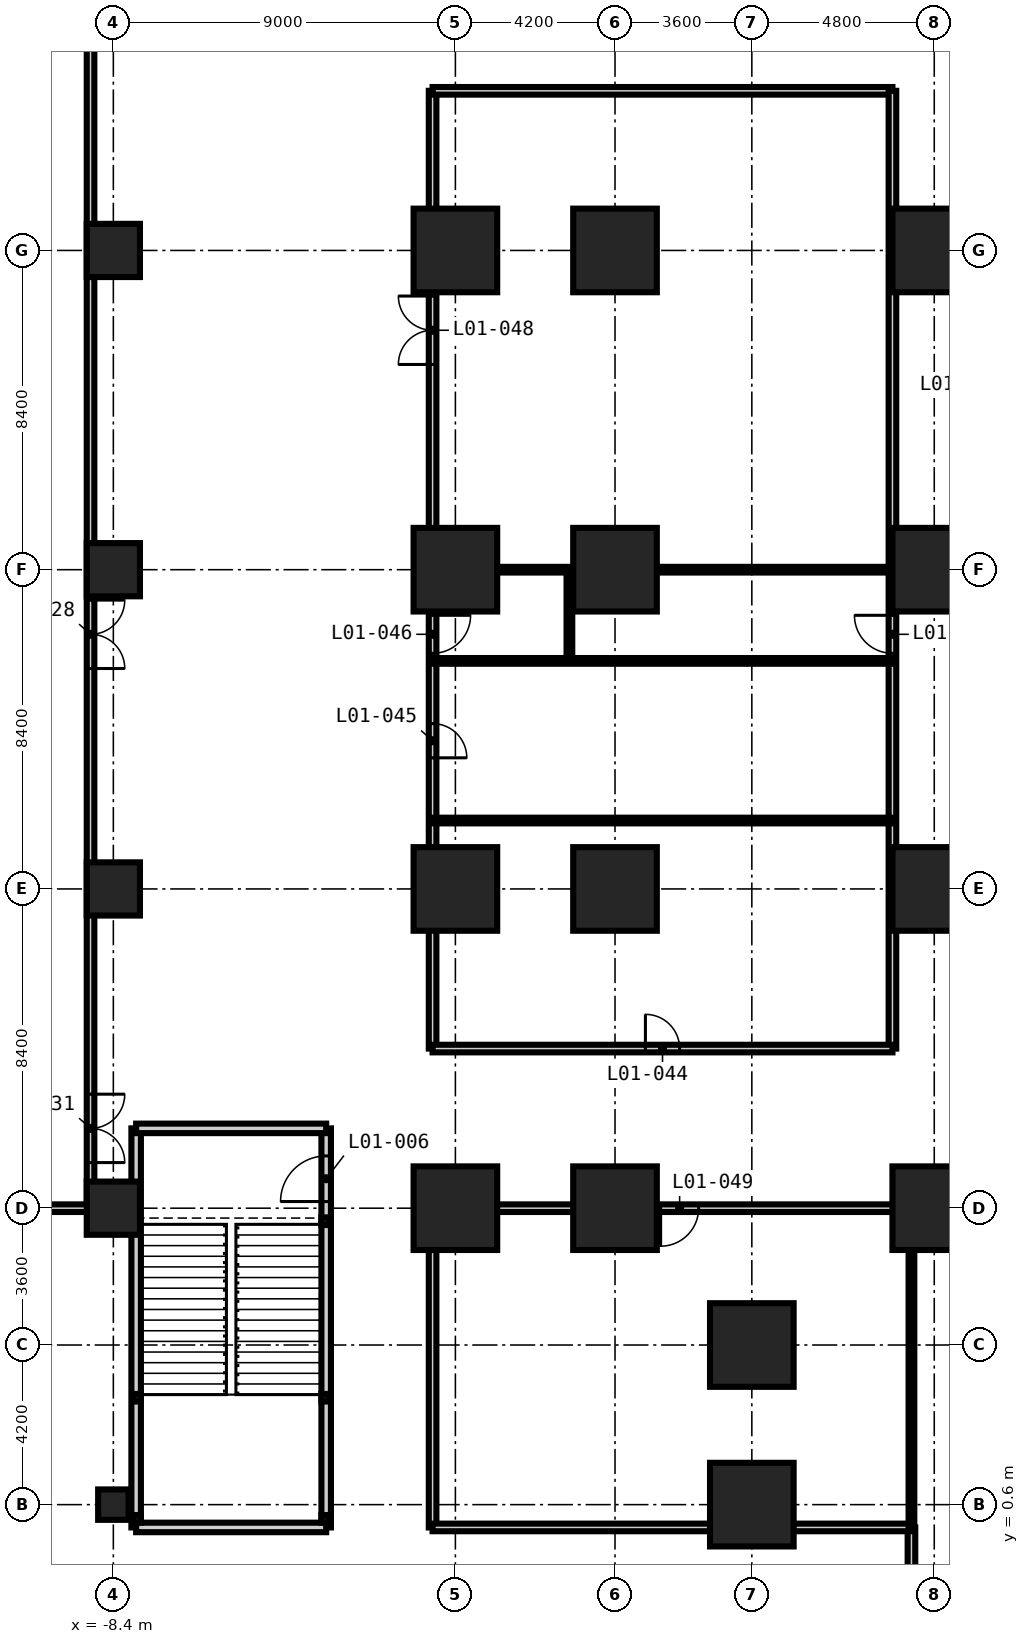
"""IFC4 building model, lengths in metres.
Left out: names, types, materials, properties, quantities, classifications, styles, units other than length and angle.
Written with IfcOpenShell. Run it as: python <this file> out.ifc"""

import sys

from ifc_helpers import new_model, si_unit, direction, frame, frame_2d, origin, origin_with_axes, origin_2d, place, context, subcontext, project, spatial, rectangle, hollow_rectangle, extrude, element, fill, save


model = new_model("IFC4")
c1 = context("Model", 3, precision=1e-05, world=origin(), true_north=direction((0.0, 1.0)))
c2 = subcontext(c1, "Body", "Model", "MODEL_VIEW")
j1 = project(units=[si_unit("LENGTHUNIT", "METRE"), si_unit("PLANEANGLEUNIT", "RADIAN")], contexts=[c1])
p1 = place(None, origin())
s1 = spatial("IfcSite", under=j1, at=p1, CompositionType="ELEMENT")
p2 = place(p1, origin())
s2 = spatial("IfcBuilding", under=s1, at=p2, CompositionType="ELEMENT")
p3 = place(p2, frame((0.0, 0.0, 6.0)))
s3 = spatial("IfcBuildingStorey", under=s2, at=p3, CompositionType="ELEMENT", Elevation=6.0)
for number, where, z_axis, x_axis in (
    (1, (0.6, 8.4, -0.3), (0.0, 0.0, 1.0), (1.0, 0.0, 0.0)),
    (2, (0.6, 16.8, -0.3), (0.0, 0.0, 1.0), (1.0, 0.0, 0.0)),
    (3, (0.6, 25.2, -0.3), (0.0, 0.0, 1.0), (1.0, 0.0, 0.0)),
    (4, (0.6, 33.6, -0.3), (0.0, 0.0, 1.0), (1.0, 0.0, 0.0)),
    (5, (4.8, 8.4, -0.3), (0.0, 0.0, 1.0), (1.0, 0.0, 0.0)),
    (6, (4.8, 16.8, -0.3), (0.0, 0.0, 1.0), (1.0, 0.0, 0.0)),
    (7, (4.8, 25.2, -0.3), (0.0, 0.0, 1.0), (1.0, 0.0, 0.0)),
    (8, (4.8, 33.6, -0.3), (0.0, 0.0, 1.0), (1.0, 0.0, 0.0)),
    (9, (8.4, 0.6, -0.3), (0.0, 0.0, 1.0), (1.0, 0.0, 0.0)),
    (10, (8.4, 4.8, -0.3), (0.0, 0.0, 1.0), (1.0, 0.0, 0.0)),
    (11, (13.2, 8.4, -0.3), (0.0, 0.0, 1.0), (1.0, 0.0, 0.0)),
    (12, (13.2, 16.8, -0.3), (0.0, 0.0, 1.0), (1.0, 0.0, 0.0)),
    (13, (13.2, 25.2, -0.3), (0.0, 0.0, 1.0), (1.0, 0.0, 0.0)),
    (14, (13.2, 33.6, -0.3), (0.0, 0.0, 1.0), (1.0, 0.0, 0.0)),
):
    element("IfcColumn", number, at=place(p3, frame(where, z_axis=z_axis, x_axis=x_axis)), inside=s3, PredefinedType="COLUMN", context=c2, shape_type="SweptSolid", body=[
        extrude(rectangle(XDim=2.2, YDim=2.2, at=origin_2d()), origin(), (0.0, 0.0, 1.0), 6.0),
    ])
p4 = place(p3, frame((-8.4, 0.6, -0.3), z_axis=(0.0, 0.0, 1.0), x_axis=(1.0, 0.0, 0.0)))
e15 = element("IfcColumn", 15, at=p4, inside=s3, PredefinedType="COLUMN", context=c2, shape_type="SweptSolid", body=[
    extrude(rectangle(XDim=0.8, YDim=0.8, at=origin_2d()), origin(), (0.0, 0.0, 1.0), 6.0),
])
for number, where, z_axis, x_axis in (
    (16, (-8.4, 8.4, -0.3), (0.0, 0.0, 1.0), (1.0, 0.0, 0.0)),
    (17, (-8.4, 16.8, -0.3), (0.0, 0.0, 1.0), (1.0, 0.0, 0.0)),
    (18, (-8.4, 25.2, -0.3), (0.0, 0.0, 1.0), (1.0, 0.0, 0.0)),
    (19, (-8.4, 33.6, -0.3), (0.0, 0.0, 1.0), (1.0, 0.0, 0.0)),
):
    element("IfcColumn", number, at=place(p3, frame(where, z_axis=z_axis, x_axis=x_axis)), inside=s3, PredefinedType="COLUMN", context=c2, shape_type="SweptSolid", body=[
        extrude(rectangle(XDim=1.4, YDim=1.4, at=origin_2d()), origin(), (0.0, 0.0, 1.0), 6.0),
    ])
p5 = place(p3, frame((0.0, 0.0, 0.0), z_axis=(0.0, 0.0, 1.0), x_axis=(0.0, 1.0, 0.0)))
e20 = element("IfcWall", 20, at=p5, inside=s3, PredefinedType="PARTITIONING", context=c2, shape_type="SweptSolid", body=[
    extrude(rectangle(XDim=8.4, YDim=0.2, at=frame_2d((4.2, 0.0))), origin(), (0.0, 0.0, 1.0), 5.7),
])
p6 = place(p3, frame((0.0, 12.6, 0.0), z_axis=(0.0, 0.0, 1.0), x_axis=(0.0, 1.0, 0.0)))
e21 = element("IfcWall", 21, at=p6, inside=s3, PredefinedType="PARTITIONING", context=c2, shape_type="SweptSolid", body=[
    extrude(rectangle(XDim=25.2, YDim=0.2, at=frame_2d((12.6, 0.0))), origin(), (0.0, 0.0, 1.0), 5.7),
])
p7 = place(p6, frame((7.65, 0.0, 0.0)))
e22 = element("IfcOpeningElement", 22, at=p7, cuts=e21, PredefinedType="OPENING", context=c2, shape_type="SweptSolid", body=[
    extrude(rectangle(XDim=0.9, YDim=2.1, at=frame_2d((0.45, 1.05))), frame((0.0, 0.11, 0.0), z_axis=(0.0, -1.0, 0.0), x_axis=(1.0, 0.0, 0.0)), (0.0, 0.0, 1.0), 0.22),
])
p8 = place(p6, frame((10.4, 0.0, 0.0)))
e23 = element("IfcOpeningElement", 23, at=p8, cuts=e21, PredefinedType="OPENING", context=c2, shape_type="SweptSolid", body=[
    extrude(rectangle(XDim=1.0, YDim=2.1, at=frame_2d((0.5, 1.05))), frame((0.0, 0.11, 0.0), z_axis=(0.0, -1.0, 0.0), x_axis=(1.0, 0.0, 0.0)), (0.0, 0.0, 1.0), 0.22),
])
p9 = place(p6, frame((18.0, 0.0, 0.0)))
e24 = element("IfcOpeningElement", 24, at=p9, cuts=e21, PredefinedType="OPENING", context=c2, shape_type="SweptSolid", body=[
    extrude(rectangle(XDim=1.8, YDim=2.4, at=frame_2d((0.9, 1.2))), frame((0.0, 0.11, 0.0), z_axis=(0.0, -1.0, 0.0), x_axis=(1.0, 0.0, 0.0)), (0.0, 0.0, 1.0), 0.22),
])
p10 = place(p3, frame((12.1, 12.6, 0.0), z_axis=(0.0, 0.0, 1.0), x_axis=(0.0, 1.0, 0.0)))
e25 = element("IfcWall", 25, at=p10, inside=s3, PredefinedType="PARTITIONING", context=c2, shape_type="SweptSolid", body=[
    extrude(rectangle(XDim=12.6, YDim=0.2, at=frame_2d((6.3, 0.0))), origin(), (0.0, 0.0, 1.0), 5.7),
])
p11 = place(p10, frame((10.4, 0.0, 0.0)))
e26 = element("IfcOpeningElement", 26, at=p11, cuts=e25, PredefinedType="OPENING", context=c2, shape_type="SweptSolid", body=[
    extrude(rectangle(XDim=1.0, YDim=2.1, at=frame_2d((0.5, 1.05))), frame((0.0, 0.11, 0.0), z_axis=(0.0, -1.0, 0.0), x_axis=(1.0, 0.0, 0.0)), (0.0, 0.0, 1.0), 0.22),
])
p12 = place(p3, frame((12.6, -8.4, 0.0), z_axis=(0.0, 0.0, 1.0), x_axis=(0.0, 1.0, 0.0)))
e27 = element("IfcWall", 27, at=p12, inside=s3, PredefinedType="PARTITIONING", context=c2, shape_type="SweptSolid", body=[
    extrude(rectangle(XDim=8.4, YDim=0.2, at=frame_2d((4.2, 0.0))), origin(), (0.0, 0.0, 1.0), 5.7),
])
p13 = place(p3, origin_with_axes())
e28 = element("IfcWall", 28, at=p13, inside=s3, PredefinedType="PARTITIONING", context=c2, shape_type="SweptSolid", body=[
    extrude(rectangle(XDim=12.6, YDim=0.2, at=frame_2d((6.3, 0.0))), origin(), (0.0, 0.0, 1.0), 5.7),
])
p14 = place(p3, frame((0.0, 8.4, 0.0), z_axis=(0.0, 0.0, 1.0), x_axis=(1.0, 0.0, 0.0)))
e29 = element("IfcWall", 29, at=p14, inside=s3, PredefinedType="PARTITIONING", context=c2, shape_type="SweptSolid", body=[
    extrude(rectangle(XDim=42.0, YDim=0.2, at=frame_2d((21.0, 0.0))), origin(), (0.0, 0.0, 1.0), 5.7),
])
p15 = place(p14, frame((6.0, 0.0, 0.0)))
e30 = element("IfcOpeningElement", 30, at=p15, cuts=e29, PredefinedType="OPENING", context=c2, shape_type="SweptSolid", body=[
    extrude(rectangle(XDim=1.0, YDim=2.1, at=frame_2d((0.5, 1.05))), frame((0.0, 0.11, 0.0), z_axis=(0.0, -1.0, 0.0), x_axis=(1.0, 0.0, 0.0)), (0.0, 0.0, 1.0), 0.22),
])
p16 = place(p14, frame((18.0, 0.0, 0.0)))
e31 = element("IfcOpeningElement", 31, at=p16, cuts=e29, PredefinedType="OPENING", context=c2, shape_type="SweptSolid", body=[
    extrude(rectangle(XDim=1.8, YDim=2.4, at=frame_2d((0.9, 1.2))), frame((0.0, 0.11, 0.0), z_axis=(0.0, -1.0, 0.0), x_axis=(1.0, 0.0, 0.0)), (0.0, 0.0, 1.0), 0.22),
])
p17 = place(p14, frame((28.9, 0.0, 0.0)))
e32 = element("IfcOpeningElement", 32, at=p17, cuts=e29, PredefinedType="OPENING", context=c2, shape_type="SweptSolid", body=[
    extrude(rectangle(XDim=1.0, YDim=2.1, at=frame_2d((0.5, 1.05))), frame((0.0, 0.11, 0.0), z_axis=(0.0, -1.0, 0.0), x_axis=(1.0, 0.0, 0.0)), (0.0, 0.0, 1.0), 0.22),
])
p18 = place(p3, frame((0.0, 12.6, 0.0), z_axis=(0.0, 0.0, 1.0), x_axis=(1.0, 0.0, 0.0)))
e33 = element("IfcWall", 33, at=p18, inside=s3, PredefinedType="PARTITIONING", context=c2, shape_type="SweptSolid", body=[
    extrude(rectangle(XDim=12.1, YDim=0.2, at=frame_2d((6.05, 0.0))), origin(), (0.0, 0.0, 1.0), 5.7),
])
p19 = place(p18, frame((5.6, 0.0, 0.0)))
e34 = element("IfcOpeningElement", 34, at=p19, cuts=e33, PredefinedType="OPENING", context=c2, shape_type="SweptSolid", body=[
    extrude(rectangle(XDim=0.9, YDim=2.1, at=frame_2d((0.45, 1.05))), frame((0.0, 0.11, 0.0), z_axis=(0.0, -1.0, 0.0), x_axis=(1.0, 0.0, 0.0)), (0.0, 0.0, 1.0), 0.22),
])
p20 = place(p3, frame((0.0, 37.8, 0.0), z_axis=(0.0, 0.0, 1.0), x_axis=(1.0, 0.0, 0.0)))
e35 = element("IfcWall", 35, at=p20, inside=s3, PredefinedType="PARTITIONING", context=c2, shape_type="SweptSolid", body=[
    extrude(rectangle(XDim=12.1, YDim=0.2, at=frame_2d((6.05, 0.0))), origin(), (0.0, 0.0, 1.0), 5.7),
])
p21 = place(p3, frame((-9.0, 42.0, 0.0), z_axis=(0.0, 0.0, 1.0), x_axis=(0.0, -1.0, 0.0)))
e36 = element("IfcWall", 36, at=p21, inside=s3, PredefinedType="PARTITIONING", context=c2, shape_type="SweptSolid", body=[
    extrude(rectangle(XDim=33.6, YDim=0.2, at=frame_2d((16.8, 0.0))), origin(), (0.0, 0.0, 1.0), 5.7),
])
p22 = place(p21, frame((17.6, 0.0, 0.0)))
e37 = element("IfcOpeningElement", 37, at=p22, cuts=e36, PredefinedType="OPENING", context=c2, shape_type="SweptSolid", body=[
    extrude(rectangle(XDim=1.8, YDim=2.4, at=frame_2d((0.9, 1.2))), frame((0.0, 0.11, 0.0), z_axis=(0.0, -1.0, 0.0), x_axis=(1.0, 0.0, 0.0)), (0.0, 0.0, 1.0), 0.22),
])
p23 = place(p21, frame((1.2, 0.0, 0.0)))
e38 = element("IfcOpeningElement", 38, at=p23, cuts=e36, PredefinedType="OPENING", context=c2, shape_type="SweptSolid", body=[
    extrude(rectangle(XDim=1.8, YDim=2.4, at=frame_2d((0.9, 1.2))), frame((0.0, 0.11, 0.0), z_axis=(0.0, -1.0, 0.0), x_axis=(1.0, 0.0, 0.0)), (0.0, 0.0, 1.0), 0.22),
])
p24 = place(p21, frame((30.6, 0.0, 0.0)))
e39 = element("IfcOpeningElement", 39, at=p24, cuts=e36, PredefinedType="OPENING", context=c2, shape_type="SweptSolid", body=[
    extrude(rectangle(XDim=1.8, YDim=2.4, at=frame_2d((0.9, 1.2))), frame((0.0, 0.11, 0.0), z_axis=(0.0, -1.0, 0.0), x_axis=(1.0, 0.0, 0.0)), (0.0, 0.0, 1.0), 0.22),
])
p25 = place(p3, frame((12.1, 37.8, 0.0), z_axis=(0.0, 0.0, 1.0), x_axis=(0.0, -1.0, 0.0)))
e40 = element("IfcWall", 40, at=p25, inside=s3, PredefinedType="PARTITIONING", context=c2, shape_type="SweptSolid", body=[
    extrude(rectangle(XDim=12.6, YDim=0.2, at=frame_2d((6.3, 0.0))), origin(), (0.0, 0.0, 1.0), 5.7),
])
p26 = place(p3, frame((-9.0, 8.4, 0.0), z_axis=(0.0, 0.0, 1.0), x_axis=(-1.0, 0.0, 0.0)))
e41 = element("IfcWall", 41, at=p26, inside=s3, PredefinedType="PARTITIONING", context=c2, shape_type="SweptSolid", body=[
    extrude(rectangle(XDim=7.8, YDim=0.2, at=frame_2d((3.9, 0.0))), origin(), (0.0, 0.0, 1.0), 5.7),
])
p27 = place(p26, frame((3.0, 0.0, 0.0)))
e42 = element("IfcOpeningElement", 42, at=p27, cuts=e41, PredefinedType="OPENING", context=c2, shape_type="SweptSolid", body=[
    extrude(rectangle(XDim=1.8, YDim=2.4, at=frame_2d((0.9, 1.2))), frame((0.0, 0.11, 0.0), z_axis=(0.0, -1.0, 0.0), x_axis=(1.0, 0.0, 0.0)), (0.0, 0.0, 1.0), 0.22),
])
p28 = place(p3, frame((3.6, 22.8, 0.0), z_axis=(0.0, 0.0, 1.0), x_axis=(0.0, 1.0, 0.0)))
e43 = element("IfcWall", 43, at=p28, inside=s3, PredefinedType="PARTITIONING", context=c2, shape_type="SweptSolid", body=[
    extrude(rectangle(XDim=2.4, YDim=0.15, at=frame_2d((1.2, 0.0))), origin(), (0.0, 0.0, 1.0), 5.7),
])
p29 = place(p3, frame((12.6, 0.0, 0.0), z_axis=(0.0, 0.0, 1.0), x_axis=(0.0, 1.0, 0.0)))
e44 = element("IfcWall", 44, at=p29, inside=s3, PredefinedType="PARTITIONING", context=c2, shape_type="SweptSolid", body=[
    extrude(rectangle(XDim=8.4, YDim=0.15, at=frame_2d((4.2, 0.0))), origin(), (0.0, 0.0, 1.0), 5.7),
])
for number, where, z_axis, x_axis in (
    (45, (0.0, 18.6, 0.0), (0.0, 0.0, 1.0), (1.0, 0.0, 0.0)),
    (46, (0.0, 22.8, 0.0), (0.0, 0.0, 1.0), (1.0, 0.0, 0.0)),
    (47, (0.0, 25.2, 0.0), (0.0, 0.0, 1.0), (1.0, 0.0, 0.0)),
):
    element("IfcWall", number, at=place(p3, frame(where, z_axis=z_axis, x_axis=x_axis)), inside=s3, PredefinedType="PARTITIONING", context=c2, shape_type="SweptSolid", body=[
        extrude(rectangle(XDim=12.1, YDim=0.15, at=frame_2d((6.05, 0.0))), origin(), (0.0, 0.0, 1.0), 5.7),
    ])
p30 = place(p3, frame((-7.8, 0.0, 0.0), z_axis=(0.0, 0.0, 1.0), x_axis=(0.0, 1.0, 0.0)))
e48 = element("IfcWall", 48, at=p30, inside=s3, PredefinedType="PARTITIONING", context=c2, shape_type="SweptSolid", body=[
    extrude(rectangle(XDim=10.5, YDim=0.25, at=frame_2d((5.25, 0.0))), origin(), (0.0, 0.0, 1.0), 5.7),
])
p31 = place(p3, frame((-2.8, 0.0, 0.0), z_axis=(0.0, 0.0, 1.0), x_axis=(0.0, 1.0, 0.0)))
e49 = element("IfcWall", 49, at=p31, inside=s3, PredefinedType="PARTITIONING", context=c2, shape_type="SweptSolid", body=[
    extrude(rectangle(XDim=10.5, YDim=0.25, at=frame_2d((5.25, 0.0))), origin(), (0.0, 0.0, 1.0), 5.7),
])
p32 = place(p31, frame((8.575, 0.0, 0.0)))
e50 = element("IfcOpeningElement", 50, at=p32, cuts=e49, PredefinedType="OPENING", context=c2, shape_type="SweptSolid", body=[
    extrude(rectangle(XDim=1.2, YDim=2.2, at=frame_2d((0.6, 1.1))), frame((0.0, 0.135, 0.0), z_axis=(0.0, -1.0, 0.0), x_axis=(1.0, 0.0, 0.0)), (0.0, 0.0, 1.0), 0.27),
])
for number, where, z_axis, x_axis in (
    (51, (-7.8, 0.0, 0.0), (0.0, 0.0, 1.0), (1.0, 0.0, 0.0)),
    (52, (-7.8, 10.5, 0.0), (0.0, 0.0, 1.0), (1.0, 0.0, 0.0)),
):
    element("IfcWall", number, at=place(p3, frame(where, z_axis=z_axis, x_axis=x_axis)), inside=s3, PredefinedType="PARTITIONING", context=c2, shape_type="SweptSolid", body=[
        extrude(rectangle(XDim=5.0, YDim=0.25, at=frame_2d((2.5, 0.0))), origin(), (0.0, 0.0, 1.0), 5.7),
    ])
for number, where, z_axis, x_axis in (
    (53, (-2.825, 8.058, -0.3), (0.0, 0.0, 1.0), (1.0, 0.0, 0.0)),
    (54, (-7.775, 3.413, -0.3), (0.0, 0.0, 1.0), (1.0, 0.0, 0.0)),
    (55, (-2.825, 3.413, -0.3), (0.0, 0.0, 1.0), (1.0, 0.0, 0.0)),
    (56, (-7.775, 0.225, -0.3), (0.0, 0.0, 1.0), (1.0, 0.0, 0.0)),
    (57, (-2.825, 0.225, -0.3), (0.0, 0.0, 1.0), (1.0, 0.0, 0.0)),
):
    element("IfcColumn", number, at=place(p3, frame(where, z_axis=z_axis, x_axis=x_axis)), inside=s3, PredefinedType="COLUMN", context=c2, shape_type="SweptSolid", body=[
        extrude(hollow_rectangle(XDim=0.2, YDim=0.2, WallThickness=0.01, at=origin_2d()), origin(), (0.0, 0.0, 1.0), 6.0),
    ])
p33 = place(p32, origin())
e58 = element("IfcDoor", 58, at=p33, inside=s3, OperationType="SINGLE_SWING_LEFT", PredefinedType="DOOR", context=c2, shape_type="SweptSolid", body=[
    extrude(rectangle(XDim=1.2, YDim=2.2, at=frame_2d((0.6, 1.1))), frame((0.0, 0.025, 0.0), z_axis=(0.0, -1.0, 0.0), x_axis=(1.0, 0.0, 0.0)), (0.0, 0.0, 1.0), 0.05),
])
fill(e50, e58)
p34 = place(p22, origin())
e59 = element("IfcDoor", 59, at=p34, inside=s3, OperationType="DOUBLE_DOOR_DOUBLE_SWING", PredefinedType="DOOR", context=c2, shape_type="SweptSolid", body=[
    extrude(rectangle(XDim=1.8, YDim=2.4, at=frame_2d((0.9, 1.2))), frame((0.0, 0.025, 0.0), z_axis=(0.0, -1.0, 0.0), x_axis=(1.0, 0.0, 0.0)), (0.0, 0.0, 1.0), 0.05),
])
fill(e37, e59)
p35 = place(p24, origin())
e60 = element("IfcDoor", 60, at=p35, inside=s3, OperationType="DOUBLE_DOOR_DOUBLE_SWING", PredefinedType="DOOR", context=c2, shape_type="SweptSolid", body=[
    extrude(rectangle(XDim=1.8, YDim=2.4, at=frame_2d((0.9, 1.2))), frame((0.0, 0.025, 0.0), z_axis=(0.0, -1.0, 0.0), x_axis=(1.0, 0.0, 0.0)), (0.0, 0.0, 1.0), 0.05),
])
fill(e39, e60)
p36 = place(p19, origin())
e61 = element("IfcDoor", 61, at=p36, inside=s3, OperationType="SINGLE_SWING_LEFT", PredefinedType="DOOR", context=c2, shape_type="SweptSolid", body=[
    extrude(rectangle(XDim=0.9, YDim=2.1, at=frame_2d((0.45, 1.05))), frame((0.0, 0.025, 0.0), z_axis=(0.0, -1.0, 0.0), x_axis=(1.0, 0.0, 0.0)), (0.0, 0.0, 1.0), 0.05),
])
fill(e34, e61)
p37 = place(p7, frame((0.9, 0.0, 0.0), z_axis=(0.0, 0.0, 1.0), x_axis=(-1.0, 0.0, 0.0)))
e62 = element("IfcDoor", 62, at=p37, inside=s3, OperationType="SINGLE_SWING_RIGHT", PredefinedType="DOOR", context=c2, shape_type="SweptSolid", body=[
    extrude(rectangle(XDim=0.9, YDim=2.1, at=frame_2d((0.45, 1.05))), frame((0.0, 0.025, 0.0), z_axis=(0.0, -1.0, 0.0), x_axis=(1.0, 0.0, 0.0)), (0.0, 0.0, 1.0), 0.05),
])
fill(e22, e62)
p38 = place(p8, frame((1.0, 0.0, 0.0), z_axis=(0.0, 0.0, 1.0), x_axis=(-1.0, 0.0, 0.0)))
e63 = element("IfcDoor", 63, at=p38, inside=s3, OperationType="SINGLE_SWING_LEFT", PredefinedType="DOOR", context=c2, shape_type="SweptSolid", body=[
    extrude(rectangle(XDim=1.0, YDim=2.1, at=frame_2d((0.5, 1.05))), frame((0.0, 0.025, 0.0), z_axis=(0.0, -1.0, 0.0), x_axis=(1.0, 0.0, 0.0)), (0.0, 0.0, 1.0), 0.05),
])
fill(e23, e63)
p39 = place(p11, origin())
e64 = element("IfcDoor", 64, at=p39, inside=s3, OperationType="SINGLE_SWING_RIGHT", PredefinedType="DOOR", context=c2, shape_type="SweptSolid", body=[
    extrude(rectangle(XDim=1.0, YDim=2.1, at=frame_2d((0.5, 1.05))), frame((0.0, 0.025, 0.0), z_axis=(0.0, -1.0, 0.0), x_axis=(1.0, 0.0, 0.0)), (0.0, 0.0, 1.0), 0.05),
])
fill(e26, e64)
p40 = place(p9, origin())
e65 = element("IfcDoor", 65, at=p40, inside=s3, OperationType="DOUBLE_DOOR_DOUBLE_SWING", PredefinedType="DOOR", context=c2, shape_type="SweptSolid", body=[
    extrude(rectangle(XDim=1.8, YDim=2.4, at=frame_2d((0.9, 1.2))), frame((0.0, 0.025, 0.0), z_axis=(0.0, -1.0, 0.0), x_axis=(1.0, 0.0, 0.0)), (0.0, 0.0, 1.0), 0.05),
])
fill(e24, e65)
p41 = place(p15, frame((1.0, 0.0, 0.0), z_axis=(0.0, 0.0, 1.0), x_axis=(-1.0, 0.0, 0.0)))
e66 = element("IfcDoor", 66, at=p41, inside=s3, OperationType="SINGLE_SWING_RIGHT", PredefinedType="DOOR", context=c2, shape_type="SweptSolid", body=[
    extrude(rectangle(XDim=1.0, YDim=2.1, at=frame_2d((0.5, 1.05))), frame((0.0, 0.025, 0.0), z_axis=(0.0, -1.0, 0.0), x_axis=(1.0, 0.0, 0.0)), (0.0, 0.0, 1.0), 0.05),
])
fill(e30, e66)
save(model, sys.argv[1])
